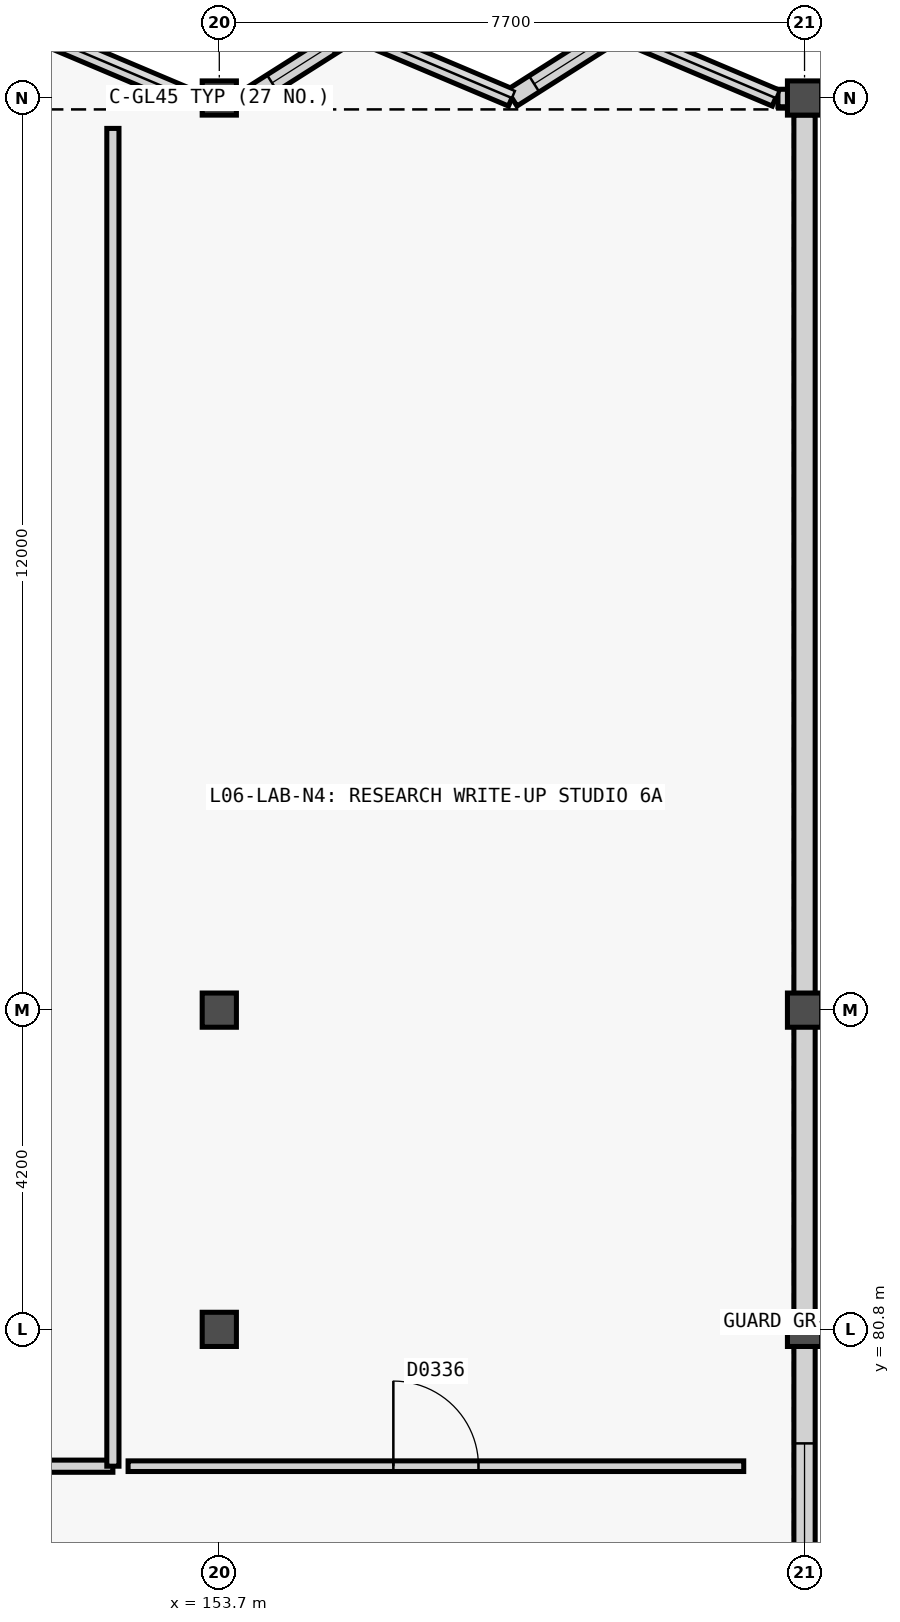
"""IFC4 building model, lengths in metres.
Left out: names, types, materials, properties, quantities, classifications, styles, units other than length and angle.
Written with IfcOpenShell. Run it as: python <this file> out.ifc"""

import sys

from ifc_helpers import new_model, si_unit, direction, frame, frame_2d, origin, origin_2d, place, context, subcontext, project, spatial, rectangle, extrude, element, fill, save


model = new_model("IFC4")
c1 = context("Model", 3, precision=1e-05, world=origin(), true_north=direction((0.0, 1.0)))
c2 = subcontext(c1, "Body", "Model", "MODEL_VIEW")
j1 = project(units=[si_unit("LENGTHUNIT", "METRE"), si_unit("PLANEANGLEUNIT", "RADIAN")], contexts=[c1])
p1 = place(None, origin())
s1 = spatial("IfcSite", under=j1, at=p1, CompositionType="ELEMENT")
p2 = place(p1, origin())
s2 = spatial("IfcBuilding", under=s1, at=p2, CompositionType="ELEMENT")
p3 = place(p2, frame((0.0, 0.0, 25.2)))
s3 = spatial("IfcBuildingStorey", under=s2, at=p3, CompositionType="ELEMENT", Elevation=25.2)
for number, where, z_axis, x_axis in (
    (1, (153.7, 80.8, 0.0), (0.0, 0.0, 1.0), (1.0, 0.0, 0.0)),
    (2, (153.7, 85.0, 0.0), (0.0, 0.0, 1.0), (1.0, 0.0, 0.0)),
    (3, (153.7, 97.0, 0.0), (0.0, 0.0, 1.0), (1.0, 0.0, 0.0)),
    (4, (161.4, 80.8, 0.0), (0.0, 0.0, 1.0), (1.0, 0.0, 0.0)),
    (5, (161.4, 85.0, 0.0), (0.0, 0.0, 1.0), (1.0, 0.0, 0.0)),
    (6, (161.4, 97.0, 0.0), (0.0, 0.0, 1.0), (1.0, 0.0, 0.0)),
):
    element("IfcColumn", number, at=place(p3, frame(where, z_axis=z_axis, x_axis=x_axis)), inside=s3, PredefinedType="COLUMN", context=c2, shape_type="SweptSolid", body=[
        extrude(rectangle(XDim=0.45, YDim=0.45, at=origin_2d()), origin(), (0.0, 0.0, 1.0), 3.6),
    ])
p4 = place(p3, frame((161.4, 96.777, 0.0), z_axis=(0.0, 0.0, 1.0), x_axis=(0.0, -1.0, 0.0)))
e7 = element("IfcWall", 7, at=p4, inside=s3, PredefinedType="SOLIDWALL", context=c2, shape_type="SweptSolid", body=[
    extrude(rectangle(XDim=32.554, YDim=0.28, at=frame_2d((16.277, 0.0))), origin(), (0.0, 0.0, 1.0), 2.78),
])
p5 = place(p4, frame((17.477, 0.0, 0.82)))
e8 = element("IfcOpeningElement", 8, at=p5, cuts=e7, PredefinedType="OPENING", context=c2, shape_type="SweptSolid", body=[
    extrude(rectangle(XDim=5.0, YDim=1.5, at=frame_2d((2.5, 0.75))), frame((0.0, 0.15, 0.0), z_axis=(0.0, -1.0, 0.0), x_axis=(1.0, 0.0, 0.0)), (0.0, 0.0, 1.0), 0.3),
])
p6 = place(p3, frame((153.35, 97.0, 0.0), z_axis=(0.0, 0.0, 1.0), x_axis=(1.0, 0.0, 0.0)))
e9 = element("IfcWall", 9, at=p6, inside=s3, PredefinedType="SOLIDWALL", context=c2, shape_type="SweptSolid", body=[
    extrude(rectangle(XDim=0.35, YDim=0.23, at=frame_2d((0.175, 0.0))), origin(), (0.0, 0.0, 1.0), 3.36),
])
p7 = place(p3, frame((153.7, 97.0, 0.0), z_axis=(0.0, 0.0, 1.0), x_axis=(1.0, 0.0, 0.0)))
e10 = element("IfcWall", 10, at=p7, inside=s3, PredefinedType="SOLIDWALL", context=c2, shape_type="SweptSolid", body=[
    extrude(rectangle(XDim=0.35, YDim=0.23, at=frame_2d((0.175, 0.0))), origin(), (0.0, 0.0, 1.0), 3.36),
])
p8 = place(p3, frame((161.05, 97.0, 0.0), z_axis=(0.0, 0.0, 1.0), x_axis=(1.0, 0.0, 0.0)))
e11 = element("IfcWall", 11, at=p8, inside=s3, PredefinedType="SOLIDWALL", context=c2, shape_type="SweptSolid", body=[
    extrude(rectangle(XDim=0.35, YDim=0.23, at=frame_2d((0.175, 0.0))), origin(), (0.0, 0.0, 1.0), 3.36),
])
p9 = place(p3, frame((151.238, 97.88, 0.0), z_axis=(0.0, 0.0, 1.0), x_axis=(0.921122216024, -0.389273506866, 0.0)))
e12 = element("IfcWall", 12, at=p9, inside=s3, PredefinedType="SOLIDWALL", context=c2, shape_type="SweptSolid", body=[
    extrude(rectangle(XDim=2.26, YDim=0.23, at=frame_2d((1.13, 0.0))), origin(), (0.0, 0.0, 1.0), 3.36),
])
p10 = place(p3, frame((154.08, 97.0, 0.0), z_axis=(0.0, 0.0, 1.0), x_axis=(0.844583954912, 0.535423143976, 0.0)))
e13 = element("IfcWall", 13, at=p10, inside=s3, PredefinedType="SOLIDWALL", context=c2, shape_type="SweptSolid", body=[
    extrude(rectangle(XDim=1.643, YDim=0.25, at=frame_2d((0.822, 0.0))), origin(), (0.0, 0.0, 1.0), 3.36),
])
p11 = place(p10, frame((0.372, 0.0, 0.82)))
e14 = element("IfcOpeningElement", 14, at=p11, cuts=e13, PredefinedType="OPENING", context=c2, shape_type="SweptSolid", body=[
    extrude(rectangle(XDim=0.9, YDim=1.45, at=frame_2d((0.45, 0.725))), frame((0.0, 0.135, 0.0), z_axis=(0.0, -1.0, 0.0), x_axis=(1.0, 0.0, 0.0)), (0.0, 0.0, 1.0), 0.27),
])
p12 = place(p3, frame((155.468, 97.88, 0.0), z_axis=(0.0, 0.0, 1.0), x_axis=(0.921122216024, -0.389273506866, 0.0)))
e15 = element("IfcWall", 15, at=p12, inside=s3, PredefinedType="SOLIDWALL", context=c2, shape_type="SweptSolid", body=[
    extrude(rectangle(XDim=2.26, YDim=0.23, at=frame_2d((1.13, 0.0))), origin(), (0.0, 0.0, 1.0), 3.36),
])
p13 = place(p3, frame((157.55, 97.0, 0.0), z_axis=(0.0, 0.0, 1.0), x_axis=(0.844583954912, 0.535423143976, 0.0)))
e16 = element("IfcWall", 16, at=p13, inside=s3, PredefinedType="SOLIDWALL", context=c2, shape_type="SweptSolid", body=[
    extrude(rectangle(XDim=1.643, YDim=0.25, at=frame_2d((0.822, 0.0))), origin(), (0.0, 0.0, 1.0), 3.36),
])
p14 = place(p13, frame((0.347, 0.0, 0.82)))
e17 = element("IfcOpeningElement", 17, at=p14, cuts=e16, PredefinedType="OPENING", context=c2, shape_type="SweptSolid", body=[
    extrude(rectangle(XDim=0.95, YDim=1.5, at=frame_2d((0.475, 0.75))), frame((0.0, 0.135, 0.0), z_axis=(0.0, -1.0, 0.0), x_axis=(1.0, 0.0, 0.0)), (0.0, 0.0, 1.0), 0.27),
])
p15 = place(p3, frame((158.938, 97.88, 0.0), z_axis=(0.0, 0.0, 1.0), x_axis=(0.921122216024, -0.389273506866, 0.0)))
e18 = element("IfcWall", 18, at=p15, inside=s3, PredefinedType="SOLIDWALL", context=c2, shape_type="SweptSolid", body=[
    extrude(rectangle(XDim=2.26, YDim=0.23, at=frame_2d((1.13, 0.0))), origin(), (0.0, 0.0, 1.0), 3.36),
])
p16 = place(p3, frame((144.0, 79.0, 0.0), z_axis=(0.0, 0.0, 1.0), x_axis=(1.0, 0.0, 0.0)))
e19 = element("IfcWall", 19, at=p16, inside=s3, PredefinedType="PARTITIONING", context=c2, shape_type="SweptSolid", body=[
    extrude(rectangle(XDim=8.3, YDim=0.16, at=frame_2d((4.15, 0.0))), origin(), (0.0, 0.0, 1.0), 3.34),
])
p17 = place(p16, frame((3.625, 0.0, 0.0)))
e20 = element("IfcOpeningElement", 20, at=p17, cuts=e19, PredefinedType="OPENING", context=c2, shape_type="SweptSolid", body=[
    extrude(rectangle(XDim=1.05, YDim=2.15, at=frame_2d((0.525, 1.075))), frame((0.0, 0.09, 0.0), z_axis=(0.0, -1.0, 0.0), x_axis=(1.0, 0.0, 0.0)), (0.0, 0.0, 1.0), 0.18),
])
p18 = place(p3, frame((152.3, 79.0, 0.0), z_axis=(0.0, 0.0, 1.0), x_axis=(0.0, 1.0, 0.0)))
e21 = element("IfcWall", 21, at=p18, inside=s3, PredefinedType="PARTITIONING", context=c2, shape_type="SweptSolid", body=[
    extrude(rectangle(XDim=17.6, YDim=0.16, at=frame_2d((8.8, 0.0))), origin(), (0.0, 0.0, 1.0), 3.34),
])
p19 = place(p3, frame((152.5, 79.0, 0.0), z_axis=(0.0, 0.0, 1.0), x_axis=(1.0, 0.0, 0.0)))
e22 = element("IfcWall", 22, at=p19, inside=s3, PredefinedType="PARTITIONING", context=c2, shape_type="SweptSolid", body=[
    extrude(rectangle(XDim=8.1, YDim=0.14, at=frame_2d((4.05, 0.0))), origin(), (0.0, 0.0, 1.0), 3.34),
])
p20 = place(p19, frame((3.49, 0.0, 0.0)))
e23 = element("IfcOpeningElement", 23, at=p20, cuts=e22, PredefinedType="OPENING", context=c2, shape_type="SweptSolid", body=[
    extrude(rectangle(XDim=1.12, YDim=2.15, at=frame_2d((0.56, 1.075))), frame((0.0, 0.08, 0.0), z_axis=(0.0, -1.0, 0.0), x_axis=(1.0, 0.0, 0.0)), (0.0, 0.0, 1.0), 0.16),
])
p21 = place(p5, origin())
e24 = element("IfcWindow", 24, at=p21, inside=s3, PartitioningType="SINGLE_PANEL", PredefinedType="WINDOW", context=c2, shape_type="SweptSolid", body=[
    extrude(rectangle(XDim=5.0, YDim=1.5, at=frame_2d((2.5, 0.75))), frame((0.0, 0.03, 0.0), z_axis=(0.0, -1.0, 0.0), x_axis=(1.0, 0.0, 0.0)), (0.0, 0.0, 1.0), 0.06),
])
fill(e8, e24)
p22 = place(p11, origin())
e25 = element("IfcWindow", 25, at=p22, inside=s3, PartitioningType="SINGLE_PANEL", PredefinedType="WINDOW", context=c2, shape_type="SweptSolid", body=[
    extrude(rectangle(XDim=0.9, YDim=1.45, at=frame_2d((0.45, 0.725))), frame((0.0, 0.03, 0.0), z_axis=(0.0, -1.0, 0.0), x_axis=(1.0, 0.0, 0.0)), (0.0, 0.0, 1.0), 0.06),
])
fill(e14, e25)
p23 = place(p14, origin())
e26 = element("IfcWindow", 26, at=p23, inside=s3, PartitioningType="SINGLE_PANEL", PredefinedType="WINDOW", context=c2, shape_type="SweptSolid", body=[
    extrude(rectangle(XDim=0.95, YDim=1.5, at=frame_2d((0.475, 0.75))), frame((0.0, 0.03, 0.0), z_axis=(0.0, -1.0, 0.0), x_axis=(1.0, 0.0, 0.0)), (0.0, 0.0, 1.0), 0.06),
])
fill(e17, e26)
p24 = place(p20, origin())
e27 = element("IfcDoor", 27, at=p24, inside=s3, OperationType="SINGLE_SWING_LEFT", PredefinedType="DOOR", context=c2, shape_type="SweptSolid", body=[
    extrude(rectangle(XDim=1.12, YDim=2.15, at=frame_2d((0.56, 1.075))), frame((0.0, 0.025, 0.0), z_axis=(0.0, -1.0, 0.0), x_axis=(1.0, 0.0, 0.0)), (0.0, 0.0, 1.0), 0.05),
])
fill(e23, e27)
save(model, sys.argv[1])
